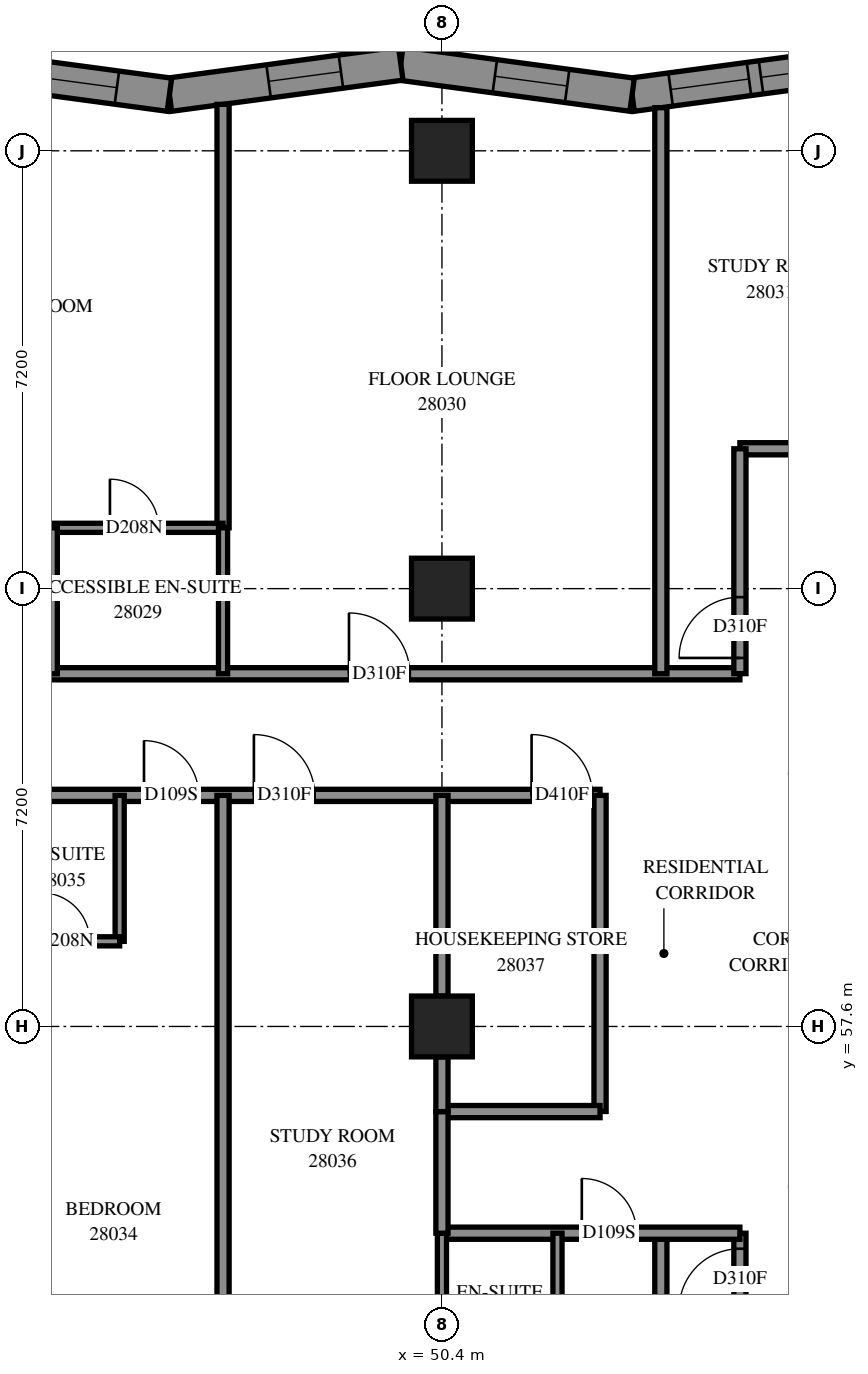
"""IFC4 building model, lengths in metres.
Left out: names, types, materials, properties, quantities, classifications, styles, units other than length and angle.
Written with IfcOpenShell. Run it as: python <this file> out.ifc"""

import sys

from ifc_helpers import new_model, si_unit, direction, frame, frame_2d, origin, origin_2d, place, context, subcontext, project, spatial, polyline, rectangle, outline, extrude, element, fill, save


model = new_model("IFC4")
c1 = context("Model", 3, precision=1e-05, world=origin(), true_north=direction((0.0, 1.0)))
c2 = subcontext(c1, "Body", "Model", "MODEL_VIEW")
j1 = project(units=[si_unit("LENGTHUNIT", "METRE"), si_unit("PLANEANGLEUNIT", "RADIAN")], contexts=[c1])
p1 = place(None, origin())
s1 = spatial("IfcSite", under=j1, at=p1, CompositionType="ELEMENT")
p2 = place(p1, origin())
s2 = spatial("IfcBuilding", under=s1, at=p2, CompositionType="ELEMENT")
p3 = place(p2, frame((0.0, 0.0, 105.0)))
s3 = spatial("IfcBuildingStorey", under=s2, at=p3, CompositionType="ELEMENT", Elevation=105.0)
for number, where, z_axis, x_axis in (
    (1, (50.4, 57.6, 0.0), (0.0, 0.0, 1.0), (1.0, 0.0, 0.0)),
    (2, (50.4, 64.8, 0.0), (0.0, 0.0, 1.0), (1.0, 0.0, 0.0)),
    (3, (50.4, 72.0, 0.0), (0.0, 0.0, 1.0), (1.0, 0.0, 0.0)),
):
    element("IfcColumn", number, at=place(p3, frame(where, z_axis=z_axis, x_axis=x_axis)), inside=s3, PredefinedType="COLUMN", context=c2, shape_type="SweptSolid", body=[
        extrude(rectangle(XDim=1.0, YDim=1.0, at=origin_2d()), origin(), (0.0, 0.0, 1.0), 3.1),
    ])
p4 = place(p3, frame((57.332, 73.434, 0.0), z_axis=(0.0, 0.0, 1.0), x_axis=(-0.9910651652, -0.1333785524, 0.0)))
e4 = element("IfcWall", 4, at=p4, inside=s3, PredefinedType="SOLIDWALL", context=c2, shape_type="SweptSolid", body=[
    extrude(outline(polyline([(-0.037, -0.275), (3.802, -0.275), (3.876, 0.275), (0.037, 0.275), (-0.037, -0.275)])), origin(), (0.0, 0.0, 1.0), 3.1),
])
p5 = place(p4, frame((0.399, 0.0, 0.5)))
e5 = element("IfcOpeningElement", 5, at=p5, cuts=e4, PredefinedType="OPENING", context=c2, shape_type="SweptSolid", body=[
    extrude(rectangle(XDim=1.3, YDim=2.45, at=frame_2d((0.65, 1.225))), frame((0.0, 0.285, 0.0), z_axis=(0.0, -1.0, 0.0), x_axis=(1.0, 0.0, 0.0)), (0.0, 0.0, 1.0), 0.57),
])
p6 = place(p4, frame((1.899, 0.0, 0.5)))
e6 = element("IfcOpeningElement", 6, at=p6, cuts=e4, PredefinedType="OPENING", context=c2, shape_type="SweptSolid", body=[
    extrude(rectangle(XDim=1.3, YDim=2.45, at=frame_2d((0.65, 1.225))), frame((0.0, 0.285, 0.0), z_axis=(0.0, -1.0, 0.0), x_axis=(1.0, 0.0, 0.0)), (0.0, 0.0, 1.0), 0.57),
])
p7 = place(p3, frame((53.527, 72.922, 0.0), z_axis=(0.0, 0.0, 1.0), x_axis=(-0.9910647018, 0.133381996, 0.0)))
e7 = element("IfcWall", 7, at=p7, inside=s3, PredefinedType="SOLIDWALL", context=c2, shape_type="SweptSolid", body=[
    extrude(outline(polyline([(0.037, -0.275), (3.876, -0.275), (3.802, 0.275), (-0.037, 0.275), (0.037, -0.275)])), origin(), (0.0, 0.0, 1.0), 3.1),
])
p8 = place(p7, frame((1.078, 0.0, 0.5)))
e8 = element("IfcOpeningElement", 8, at=p8, cuts=e7, PredefinedType="OPENING", context=c2, shape_type="SweptSolid", body=[
    extrude(rectangle(XDim=1.2, YDim=2.45, at=frame_2d((0.6, 1.225))), frame((0.0, 0.285, 0.0), z_axis=(0.0, -1.0, 0.0), x_axis=(1.0, 0.0, 0.0)), (0.0, 0.0, 1.0), 0.57),
])
p9 = place(p3, frame((49.723, 73.434, 0.0), z_axis=(0.0, 0.0, 1.0), x_axis=(-0.9910651652, -0.1333785524, 0.0)))
e9 = element("IfcWall", 9, at=p9, inside=s3, PredefinedType="SOLIDWALL", context=c2, shape_type="SweptSolid", body=[
    extrude(outline(polyline([(-0.037, -0.275), (3.802, -0.275), (3.876, 0.275), (0.037, 0.275), (-0.037, -0.275)])), origin(), (0.0, 0.0, 1.0), 3.1),
])
p10 = place(p9, frame((0.993, 0.0, 0.5)))
e10 = element("IfcOpeningElement", 10, at=p10, cuts=e9, PredefinedType="OPENING", context=c2, shape_type="SweptSolid", body=[
    extrude(rectangle(XDim=1.2, YDim=2.45, at=frame_2d((0.6, 1.225))), frame((0.0, 0.285, 0.0), z_axis=(0.0, -1.0, 0.0), x_axis=(1.0, 0.0, 0.0)), (0.0, 0.0, 1.0), 0.57),
])
p11 = place(p3, frame((45.919, 72.922, 0.0), z_axis=(0.0, 0.0, 1.0), x_axis=(-0.9910651652, 0.1333785524, 0.0)))
e11 = element("IfcWall", 11, at=p11, inside=s3, PredefinedType="SOLIDWALL", context=c2, shape_type="SweptSolid", body=[
    extrude(outline(polyline([(0.037, -0.275), (3.876, -0.275), (3.802, 0.275), (-0.037, 0.275), (0.037, -0.275)])), origin(), (0.0, 0.0, 1.0), 3.1),
])
p12 = place(p11, frame((0.872, 0.0, 0.5)))
e12 = element("IfcOpeningElement", 12, at=p12, cuts=e11, PredefinedType="OPENING", context=c2, shape_type="SweptSolid", body=[
    extrude(rectangle(XDim=1.2, YDim=2.45, at=frame_2d((0.6, 1.225))), frame((0.0, 0.285, 0.0), z_axis=(0.0, -1.0, 0.0), x_axis=(1.0, 0.0, 0.0)), (0.0, 0.0, 1.0), 0.57),
])
p13 = place(p3, frame((28.8, 61.4, 0.0), z_axis=(0.0, 0.0, 1.0), x_axis=(1.0, 0.0, 0.0)))
e13 = element("IfcWall", 13, at=p13, inside=s3, PredefinedType="PARTITIONING", context=c2, shape_type="SweptSolid", body=[
    extrude(rectangle(XDim=24.2, YDim=0.2, at=frame_2d((12.1, 0.0))), origin(), (0.0, 0.0, 1.0), 3.1),
])
p14 = place(p13, frame((2.3, 0.0, 0.0)))
e14 = element("IfcOpeningElement", 14, at=p14, cuts=e13, PredefinedType="OPENING", context=c2, shape_type="SweptSolid", body=[
    extrude(rectangle(XDim=0.9, YDim=2.1, at=frame_2d((0.45, 1.05))), frame((0.0, 0.11, 0.0), z_axis=(0.0, -1.0, 0.0), x_axis=(1.0, 0.0, 0.0)), (0.0, 0.0, 1.0), 0.22),
])
p15 = place(p13, frame((5.901, 0.0, 0.0)))
e15 = element("IfcOpeningElement", 15, at=p15, cuts=e13, PredefinedType="OPENING", context=c2, shape_type="SweptSolid", body=[
    extrude(rectangle(XDim=0.9, YDim=2.1, at=frame_2d((0.45, 1.05))), frame((0.0, 0.11, 0.0), z_axis=(0.0, -1.0, 0.0), x_axis=(1.0, 0.0, 0.0)), (0.0, 0.0, 1.0), 0.22),
])
p16 = place(p13, frame((11.307, 0.0, 0.0)))
e16 = element("IfcOpeningElement", 16, at=p16, cuts=e13, PredefinedType="OPENING", context=c2, shape_type="SweptSolid", body=[
    extrude(rectangle(XDim=1.0, YDim=2.1, at=frame_2d((0.5, 1.05))), frame((0.0, 0.11, 0.0), z_axis=(0.0, -1.0, 0.0), x_axis=(1.0, 0.0, 0.0)), (0.0, 0.0, 1.0), 0.22),
])
p17 = place(p13, frame((16.7, 0.0, 0.0)))
e17 = element("IfcOpeningElement", 17, at=p17, cuts=e13, PredefinedType="OPENING", context=c2, shape_type="SweptSolid", body=[
    extrude(rectangle(XDim=0.9, YDim=2.1, at=frame_2d((0.45, 1.05))), frame((0.0, 0.11, 0.0), z_axis=(0.0, -1.0, 0.0), x_axis=(1.0, 0.0, 0.0)), (0.0, 0.0, 1.0), 0.22),
])
p18 = place(p13, frame((18.508, 0.0, 0.0)))
e18 = element("IfcOpeningElement", 18, at=p18, cuts=e13, PredefinedType="OPENING", context=c2, shape_type="SweptSolid", body=[
    extrude(rectangle(XDim=1.0, YDim=2.1, at=frame_2d((0.5, 1.05))), frame((0.0, 0.11, 0.0), z_axis=(0.0, -1.0, 0.0), x_axis=(1.0, 0.0, 0.0)), (0.0, 0.0, 1.0), 0.22),
])
p19 = place(p13, frame((23.074, 0.0, 0.0)))
e19 = element("IfcOpeningElement", 19, at=p19, cuts=e13, PredefinedType="OPENING", context=c2, shape_type="SweptSolid", body=[
    extrude(rectangle(XDim=1.0, YDim=2.1, at=frame_2d((0.5, 1.05))), frame((0.0, 0.11, 0.0), z_axis=(0.0, -1.0, 0.0), x_axis=(1.0, 0.0, 0.0)), (0.0, 0.0, 1.0), 0.22),
])
p20 = place(p3, frame((33.4, 63.4, 0.0), z_axis=(0.0, 0.0, 1.0), x_axis=(1.0, 0.0, 0.0)))
e20 = element("IfcWall", 20, at=p20, inside=s3, PredefinedType="PARTITIONING", context=c2, shape_type="SweptSolid", body=[
    extrude(rectangle(XDim=21.9, YDim=0.2, at=frame_2d((10.95, 0.0))), origin(), (0.0, 0.0, 1.0), 3.1),
])
p21 = place(p20, frame((3.152, 0.0, 0.0)))
e21 = element("IfcOpeningElement", 21, at=p21, cuts=e20, PredefinedType="OPENING", context=c2, shape_type="SweptSolid", body=[
    extrude(rectangle(XDim=0.9, YDim=2.1, at=frame_2d((0.45, 1.05))), frame((0.0, 0.11, 0.0), z_axis=(0.0, -1.0, 0.0), x_axis=(1.0, 0.0, 0.0)), (0.0, 0.0, 1.0), 0.22),
])
p22 = place(p20, frame((8.161, 0.0, 0.0)))
e22 = element("IfcOpeningElement", 22, at=p22, cuts=e20, PredefinedType="OPENING", context=c2, shape_type="SweptSolid", body=[
    extrude(rectangle(XDim=0.9, YDim=2.1, at=frame_2d((0.45, 1.05))), frame((0.0, 0.11, 0.0), z_axis=(0.0, -1.0, 0.0), x_axis=(1.0, 0.0, 0.0)), (0.0, 0.0, 1.0), 0.22),
])
p23 = place(p20, frame((15.471, 0.0, 0.0)))
e23 = element("IfcOpeningElement", 23, at=p23, cuts=e20, PredefinedType="OPENING", context=c2, shape_type="SweptSolid", body=[
    extrude(rectangle(XDim=1.0, YDim=2.1, at=frame_2d((0.5, 1.05))), frame((0.0, 0.11, 0.0), z_axis=(0.0, -1.0, 0.0), x_axis=(1.0, 0.0, 0.0)), (0.0, 0.0, 1.0), 0.22),
])
p24 = place(p3, frame((55.3, 67.1, 0.0), z_axis=(0.0, 0.0, 1.0), x_axis=(1.0, 0.0, 0.0)))
e24 = element("IfcWall", 24, at=p24, inside=s3, PredefinedType="PARTITIONING", context=c2, shape_type="SweptSolid", body=[
    extrude(rectangle(XDim=19.0, YDim=0.2, at=frame_2d((9.5, 0.0))), origin(), (0.0, 0.0, 1.0), 3.1),
])
p25 = place(p24, frame((6.199, 0.0, 0.0)))
e25 = element("IfcOpeningElement", 25, at=p25, cuts=e24, PredefinedType="OPENING", context=c2, shape_type="SweptSolid", body=[
    extrude(rectangle(XDim=0.9, YDim=2.1, at=frame_2d((0.45, 1.05))), frame((0.0, 0.11, 0.0), z_axis=(0.0, -1.0, 0.0), x_axis=(1.0, 0.0, 0.0)), (0.0, 0.0, 1.0), 0.22),
])
p26 = place(p24, frame((13.399, 0.0, 0.0)))
e26 = element("IfcOpeningElement", 26, at=p26, cuts=e24, PredefinedType="OPENING", context=c2, shape_type="SweptSolid", body=[
    extrude(rectangle(XDim=0.9, YDim=2.1, at=frame_2d((0.45, 1.05))), frame((0.0, 0.11, 0.0), z_axis=(0.0, -1.0, 0.0), x_axis=(1.0, 0.0, 0.0)), (0.0, 0.0, 1.0), 0.22),
])
p27 = place(p3, frame((54.0, 42.348, 0.0), z_axis=(0.0, 0.0, 1.0), x_axis=(0.0, 1.0, 0.0)))
e27 = element("IfcWall", 27, at=p27, inside=s3, PredefinedType="PARTITIONING", context=c2, shape_type="SweptSolid", body=[
    extrude(rectangle(XDim=11.852, YDim=0.2, at=frame_2d((5.926, 0.0))), origin(), (0.0, 0.0, 1.0), 3.1),
])
p28 = place(p3, frame((46.8, 49.75, 0.0), z_axis=(0.0, 0.0, 1.0), x_axis=(0.0, 1.0, 0.0)))
e28 = element("IfcWall", 28, at=p28, inside=s3, PredefinedType="PARTITIONING", context=c2, shape_type="SweptSolid", body=[
    extrude(rectangle(XDim=11.65, YDim=0.2, at=frame_2d((5.825, 0.0))), origin(), (0.0, 0.0, 1.0), 3.1),
])
p29 = place(p3, frame((54.0, 63.4, 0.0), z_axis=(0.0, 0.0, 1.0), x_axis=(0.0, 1.0, 0.0)))
e29 = element("IfcWall", 29, at=p29, inside=s3, PredefinedType="PARTITIONING", context=c2, shape_type="SweptSolid", body=[
    extrude(rectangle(XDim=9.309, YDim=0.2, at=frame_2d((4.654, 0.0))), origin(), (0.0, 0.0, 1.0), 3.1),
])
p30 = place(p3, frame((46.8, 65.8, 0.0), z_axis=(0.0, 0.0, 1.0), x_axis=(0.0, 1.0, 0.0)))
e30 = element("IfcWall", 30, at=p30, inside=s3, PredefinedType="PARTITIONING", context=c2, shape_type="SweptSolid", body=[
    extrude(rectangle(XDim=6.964, YDim=0.2, at=frame_2d((3.482, 0.0))), origin(), (0.0, 0.0, 1.0), 3.1),
])
p31 = place(p3, frame((55.3, 48.1, 0.0), z_axis=(0.0, 0.0, 1.0), x_axis=(0.0, 1.0, 0.0)))
e31 = element("IfcWall", 31, at=p31, inside=s3, PredefinedType="PARTITIONING", context=c2, shape_type="SweptSolid", body=[
    extrude(rectangle(XDim=6.1, YDim=0.2, at=frame_2d((3.05, 0.0))), origin(), (0.0, 0.0, 1.0), 3.1),
])
p32 = place(p31, frame((4.845, 0.0, 0.0)))
e32 = element("IfcOpeningElement", 32, at=p32, cuts=e31, PredefinedType="OPENING", context=c2, shape_type="SweptSolid", body=[
    extrude(rectangle(XDim=1.0, YDim=2.1, at=frame_2d((0.5, 1.05))), frame((0.0, 0.11, 0.0), z_axis=(0.0, -1.0, 0.0), x_axis=(1.0, 0.0, 0.0)), (0.0, 0.0, 1.0), 0.22),
])
p33 = place(p3, frame((53.0, 56.202, 0.0), z_axis=(0.0, 0.0, 1.0), x_axis=(0.0, 1.0, 0.0)))
e33 = element("IfcWall", 33, at=p33, inside=s3, PredefinedType="PARTITIONING", context=c2, shape_type="SweptSolid", body=[
    extrude(rectangle(XDim=5.198, YDim=0.2, at=frame_2d((2.599, 0.0))), origin(), (0.0, 0.0, 1.0), 3.1),
])
p34 = place(p3, frame((50.4, 54.2, 0.0), z_axis=(0.0, 0.0, 1.0), x_axis=(1.0, 0.0, 0.0)))
e34 = element("IfcWall", 34, at=p34, inside=s3, PredefinedType="PARTITIONING", context=c2, shape_type="SweptSolid", body=[
    extrude(rectangle(XDim=4.9, YDim=0.2, at=frame_2d((2.45, 0.0))), origin(), (0.0, 0.0, 1.0), 3.1),
])
p35 = place(p34, frame((2.3, 0.0, 0.0)))
e35 = element("IfcOpeningElement", 35, at=p35, cuts=e34, PredefinedType="OPENING", context=c2, shape_type="SweptSolid", body=[
    extrude(rectangle(XDim=0.9, YDim=2.1, at=frame_2d((0.45, 1.05))), frame((0.0, 0.11, 0.0), z_axis=(0.0, -1.0, 0.0), x_axis=(1.0, 0.0, 0.0)), (0.0, 0.0, 1.0), 0.22),
])
p36 = place(p3, frame((55.3, 63.402, 0.0), z_axis=(0.0, 0.0, 1.0), x_axis=(0.0, 1.0, 0.0)))
e36 = element("IfcWall", 36, at=p36, inside=s3, PredefinedType="PARTITIONING", context=c2, shape_type="SweptSolid", body=[
    extrude(rectangle(XDim=3.698, YDim=0.2, at=frame_2d((1.849, 0.0))), origin(), (0.0, 0.0, 1.0), 3.1),
])
p37 = place(p36, frame((0.258, 0.0, 0.0)))
e37 = element("IfcOpeningElement", 37, at=p37, cuts=e36, PredefinedType="OPENING", context=c2, shape_type="SweptSolid", body=[
    extrude(rectangle(XDim=1.0, YDim=2.1, at=frame_2d((0.5, 1.05))), frame((0.0, 0.11, 0.0), z_axis=(0.0, -1.0, 0.0), x_axis=(1.0, 0.0, 0.0)), (0.0, 0.0, 1.0), 0.22),
])
p38 = place(p3, frame((50.4, 58.1, 0.0), z_axis=(0.0, 0.0, 1.0), x_axis=(0.0, 1.0, 0.0)))
e38 = element("IfcWall", 38, at=p38, inside=s3, PredefinedType="PARTITIONING", context=c2, shape_type="SweptSolid", body=[
    extrude(rectangle(XDim=3.3, YDim=0.2, at=frame_2d((1.65, 0.0))), origin(), (0.0, 0.0, 1.0), 3.1),
])
p39 = place(p3, frame((44.0, 65.8, 0.0), z_axis=(0.0, 0.0, 1.0), x_axis=(1.0, 0.0, 0.0)))
e39 = element("IfcWall", 39, at=p39, inside=s3, PredefinedType="PARTITIONING", context=c2, shape_type="SweptSolid", body=[
    extrude(rectangle(XDim=2.8, YDim=0.15, at=frame_2d((1.4, 0.0))), origin(), (0.0, 0.0, 1.0), 3.1),
])
p40 = place(p39, frame((0.94, 0.0, 0.0)))
e40 = element("IfcOpeningElement", 40, at=p40, cuts=e39, PredefinedType="OPENING", context=c2, shape_type="SweptSolid", body=[
    extrude(rectangle(XDim=0.8, YDim=2.1, at=frame_2d((0.4, 1.05))), frame((0.0, 0.085, 0.0), z_axis=(0.0, -1.0, 0.0), x_axis=(1.0, 0.0, 0.0)), (0.0, 0.0, 1.0), 0.17),
])
p41 = place(p3, frame((50.4, 56.2, 0.0), z_axis=(0.0, 0.0, 1.0), x_axis=(1.0, 0.0, 0.0)))
e41 = element("IfcWall", 41, at=p41, inside=s3, PredefinedType="PARTITIONING", context=c2, shape_type="SweptSolid", body=[
    extrude(rectangle(XDim=2.6, YDim=0.2, at=frame_2d((1.3, 0.0))), origin(), (0.0, 0.0, 1.0), 3.1),
])
for number, where, z_axis, x_axis in (
    (42, (52.3, 51.8, 0.0), (0.0, 0.0, 1.0), (0.0, 1.0, 0.0)),
    (43, (50.4, 51.8, 0.0), (0.0, 0.0, 1.0), (0.0, 1.0, 0.0)),
    (44, (45.1, 59.0, 0.0), (0.0, 0.0, 1.0), (0.0, 1.0, 0.0)),
    (45, (44.0, 63.4, 0.0), (0.0, 0.0, 1.0), (0.0, 1.0, 0.0)),
    (46, (46.8, 63.4, 0.0), (0.0, 0.0, 1.0), (0.0, 1.0, 0.0)),
):
    element("IfcWall", number, at=place(p3, frame(where, z_axis=z_axis, x_axis=x_axis)), inside=s3, PredefinedType="PARTITIONING", context=c2, shape_type="SweptSolid", body=[
        extrude(rectangle(XDim=2.4, YDim=0.15, at=frame_2d((1.2, 0.0))), origin(), (0.0, 0.0, 1.0), 3.1),
    ])
p42 = place(p3, frame((50.4, 54.2, 0.0), z_axis=(0.0, 0.0, 1.0), x_axis=(0.0, 1.0, 0.0)))
e47 = element("IfcWall", 47, at=p42, inside=s3, PredefinedType="PARTITIONING", context=c2, shape_type="SweptSolid", body=[
    extrude(rectangle(XDim=2.0, YDim=0.2, at=frame_2d((1.0, 0.0))), origin(), (0.0, 0.0, 1.0), 3.1),
])
p43 = place(p3, frame((43.2, 59.0, 0.0), z_axis=(0.0, 0.0, 1.0), x_axis=(1.0, 0.0, 0.0)))
e48 = element("IfcWall", 48, at=p43, inside=s3, PredefinedType="PARTITIONING", context=c2, shape_type="SweptSolid", body=[
    extrude(rectangle(XDim=1.9, YDim=0.15, at=frame_2d((0.95, 0.0))), origin(), (0.0, 0.0, 1.0), 3.1),
])
p44 = place(p43, frame((0.607, 0.0, 0.0)))
e49 = element("IfcOpeningElement", 49, at=p44, cuts=e48, PredefinedType="OPENING", context=c2, shape_type="SweptSolid", body=[
    extrude(rectangle(XDim=0.8, YDim=2.1, at=frame_2d((0.4, 1.05))), frame((0.0, 0.085, 0.0), z_axis=(0.0, -1.0, 0.0), x_axis=(1.0, 0.0, 0.0)), (0.0, 0.0, 1.0), 0.17),
])
p45 = place(p3, frame((50.4, 56.2, 0.0), z_axis=(0.0, 0.0, 1.0), x_axis=(0.0, 1.0, 0.0)))
e50 = element("IfcWall", 50, at=p45, inside=s3, PredefinedType="PARTITIONING", context=c2, shape_type="SweptSolid", body=[
    extrude(rectangle(XDim=0.9, YDim=0.2, at=frame_2d((0.45, 0.0))), origin(), (0.0, 0.0, 1.0), 3.1),
])
p46 = place(p5, origin())
e51 = element("IfcWindow", 51, at=p46, inside=s3, PartitioningType="SINGLE_PANEL", PredefinedType="WINDOW", context=c2, shape_type="SweptSolid", body=[
    extrude(rectangle(XDim=1.3, YDim=2.45, at=frame_2d((0.65, 1.225))), frame((0.0, 0.155, 0.0), z_axis=(0.0, -1.0, 0.0), x_axis=(1.0, 0.0, 0.0)), (0.0, 0.0, 1.0), 0.06),
])
fill(e5, e51)
p47 = place(p6, origin())
e52 = element("IfcWindow", 52, at=p47, inside=s3, PartitioningType="SINGLE_PANEL", PredefinedType="WINDOW", context=c2, shape_type="SweptSolid", body=[
    extrude(rectangle(XDim=1.3, YDim=2.45, at=frame_2d((0.65, 1.225))), frame((0.0, 0.155, 0.0), z_axis=(0.0, -1.0, 0.0), x_axis=(1.0, 0.0, 0.0)), (0.0, 0.0, 1.0), 0.06),
])
fill(e6, e52)
p48 = place(p8, origin())
e53 = element("IfcWindow", 53, at=p48, inside=s3, PartitioningType="SINGLE_PANEL", PredefinedType="WINDOW", context=c2, shape_type="SweptSolid", body=[
    extrude(rectangle(XDim=1.2, YDim=2.45, at=frame_2d((0.6, 1.225))), frame((0.0, 0.155, 0.0), z_axis=(0.0, -1.0, 0.0), x_axis=(1.0, 0.0, 0.0)), (0.0, 0.0, 1.0), 0.06),
])
fill(e8, e53)
p49 = place(p10, origin())
e54 = element("IfcWindow", 54, at=p49, inside=s3, PartitioningType="SINGLE_PANEL", PredefinedType="WINDOW", context=c2, shape_type="SweptSolid", body=[
    extrude(rectangle(XDim=1.2, YDim=2.45, at=frame_2d((0.6, 1.225))), frame((0.0, 0.155, 0.0), z_axis=(0.0, -1.0, 0.0), x_axis=(1.0, 0.0, 0.0)), (0.0, 0.0, 1.0), 0.06),
])
fill(e10, e54)
p50 = place(p12, origin())
e55 = element("IfcWindow", 55, at=p50, inside=s3, PartitioningType="SINGLE_PANEL", PredefinedType="WINDOW", context=c2, shape_type="SweptSolid", body=[
    extrude(rectangle(XDim=1.2, YDim=2.45, at=frame_2d((0.6, 1.225))), frame((0.0, 0.155, 0.0), z_axis=(0.0, -1.0, 0.0), x_axis=(1.0, 0.0, 0.0)), (0.0, 0.0, 1.0), 0.06),
])
fill(e12, e55)
p51 = place(p40, origin())
e56 = element("IfcDoor", 56, at=p51, inside=s3, OperationType="SINGLE_SWING_RIGHT", PredefinedType="DOOR", context=c2, shape_type="SweptSolid", body=[
    extrude(rectangle(XDim=0.8, YDim=2.1, at=frame_2d((0.4, 1.05))), frame((0.0, 0.025, 0.0), z_axis=(0.0, -1.0, 0.0), x_axis=(1.0, 0.0, 0.0)), (0.0, 0.0, 1.0), 0.05),
])
fill(e40, e56)
p52 = place(p23, origin())
e57 = element("IfcDoor", 57, at=p52, inside=s3, OperationType="SINGLE_SWING_LEFT", PredefinedType="DOOR", context=c2, shape_type="SweptSolid", body=[
    extrude(rectangle(XDim=1.0, YDim=2.1, at=frame_2d((0.5, 1.05))), frame((0.0, 0.025, 0.0), z_axis=(0.0, -1.0, 0.0), x_axis=(1.0, 0.0, 0.0)), (0.0, 0.0, 1.0), 0.05),
])
fill(e23, e57)
p53 = place(p37, origin())
e58 = element("IfcDoor", 58, at=p53, inside=s3, OperationType="SINGLE_SWING_LEFT", PredefinedType="DOOR", context=c2, shape_type="SweptSolid", body=[
    extrude(rectangle(XDim=1.0, YDim=2.1, at=frame_2d((0.5, 1.05))), frame((0.0, 0.025, 0.0), z_axis=(0.0, -1.0, 0.0), x_axis=(1.0, 0.0, 0.0)), (0.0, 0.0, 1.0), 0.05),
])
fill(e37, e58)
p54 = place(p17, origin())
e59 = element("IfcDoor", 59, at=p54, inside=s3, OperationType="SINGLE_SWING_LEFT", PredefinedType="DOOR", context=c2, shape_type="SweptSolid", body=[
    extrude(rectangle(XDim=0.9, YDim=2.1, at=frame_2d((0.45, 1.05))), frame((0.0, 0.025, 0.0), z_axis=(0.0, -1.0, 0.0), x_axis=(1.0, 0.0, 0.0)), (0.0, 0.0, 1.0), 0.05),
])
fill(e17, e59)
p55 = place(p44, origin())
e60 = element("IfcDoor", 60, at=p55, inside=s3, OperationType="SINGLE_SWING_RIGHT", PredefinedType="DOOR", context=c2, shape_type="SweptSolid", body=[
    extrude(rectangle(XDim=0.8, YDim=2.1, at=frame_2d((0.4, 1.05))), frame((0.0, 0.025, 0.0), z_axis=(0.0, -1.0, 0.0), x_axis=(1.0, 0.0, 0.0)), (0.0, 0.0, 1.0), 0.05),
])
fill(e49, e60)
p56 = place(p18, origin())
e61 = element("IfcDoor", 61, at=p56, inside=s3, OperationType="SINGLE_SWING_RIGHT", PredefinedType="DOOR", context=c2, shape_type="SweptSolid", body=[
    extrude(rectangle(XDim=1.0, YDim=2.1, at=frame_2d((0.5, 1.05))), frame((0.0, 0.025, 0.0), z_axis=(0.0, -1.0, 0.0), x_axis=(1.0, 0.0, 0.0)), (0.0, 0.0, 1.0), 0.05),
])
fill(e18, e61)
p57 = place(p19, origin())
e62 = element("IfcDoor", 62, at=p57, inside=s3, OperationType="SINGLE_SWING_LEFT", PredefinedType="DOOR", context=c2, shape_type="SweptSolid", body=[
    extrude(rectangle(XDim=1.0, YDim=2.1, at=frame_2d((0.5, 1.05))), frame((0.0, 0.025, 0.0), z_axis=(0.0, -1.0, 0.0), x_axis=(1.0, 0.0, 0.0)), (0.0, 0.0, 1.0), 0.05),
])
fill(e19, e62)
p58 = place(p35, origin())
e63 = element("IfcDoor", 63, at=p58, inside=s3, OperationType="SINGLE_SWING_LEFT", PredefinedType="DOOR", context=c2, shape_type="SweptSolid", body=[
    extrude(rectangle(XDim=0.9, YDim=2.1, at=frame_2d((0.45, 1.05))), frame((0.0, 0.025, 0.0), z_axis=(0.0, -1.0, 0.0), x_axis=(1.0, 0.0, 0.0)), (0.0, 0.0, 1.0), 0.05),
])
fill(e35, e63)
p59 = place(p32, origin())
e64 = element("IfcDoor", 64, at=p59, inside=s3, OperationType="SINGLE_SWING_RIGHT", PredefinedType="DOOR", context=c2, shape_type="SweptSolid", body=[
    extrude(rectangle(XDim=1.0, YDim=2.1, at=frame_2d((0.5, 1.05))), frame((0.0, 0.025, 0.0), z_axis=(0.0, -1.0, 0.0), x_axis=(1.0, 0.0, 0.0)), (0.0, 0.0, 1.0), 0.05),
])
fill(e32, e64)
save(model, sys.argv[1])
